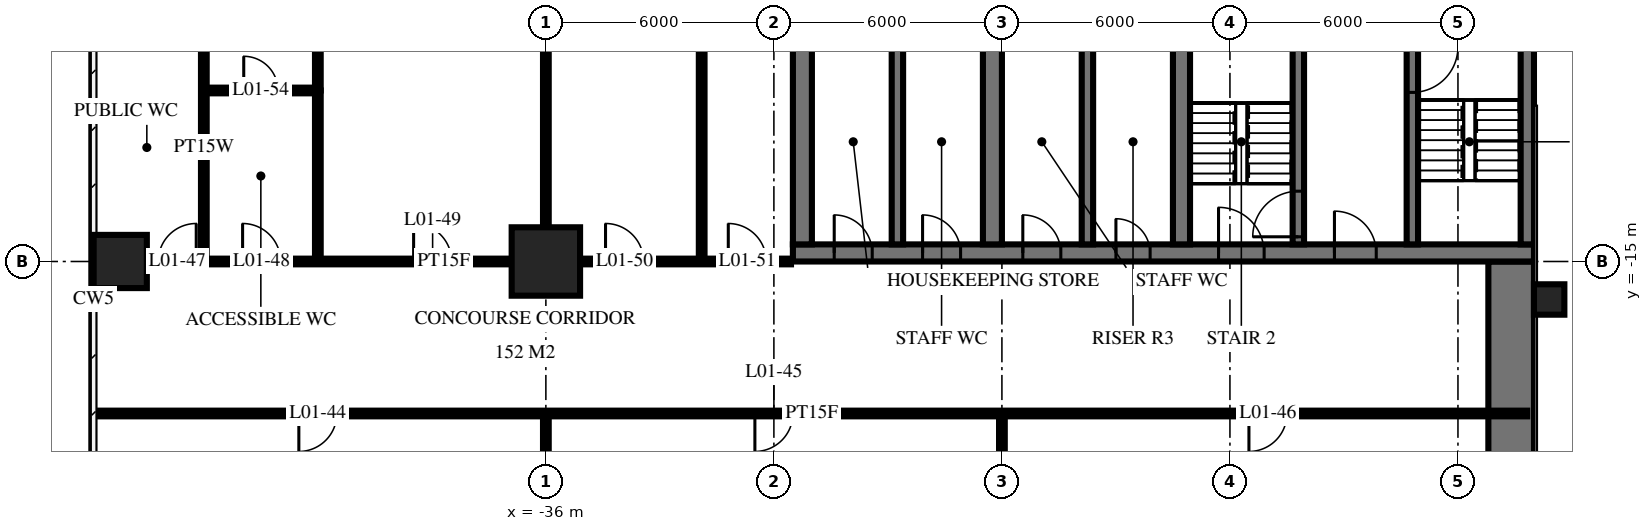
"""IFC4 building model, lengths in metres.
Left out: names, types, materials, properties, quantities, classifications, styles, units other than length and angle.
Written with IfcOpenShell. Run it as: python <this file> out.ifc"""

import sys

from ifc_helpers import new_model, si_unit, direction, frame, frame_2d, origin, origin_2d, place, context, subcontext, project, spatial, rectangle, circle, extrude, element, fill, save


model = new_model("IFC4")
c1 = context("Model", 3, precision=1e-05, world=origin(), true_north=direction((0.0, 1.0)))
c2 = subcontext(c1, "Body", "Model", "MODEL_VIEW")
j1 = project(units=[si_unit("LENGTHUNIT", "METRE"), si_unit("PLANEANGLEUNIT", "RADIAN")], contexts=[c1])
p1 = place(None, origin())
s1 = spatial("IfcSite", under=j1, at=p1, CompositionType="ELEMENT")
p2 = place(p1, origin())
s2 = spatial("IfcBuilding", under=s1, at=p2, CompositionType="ELEMENT")
p3 = place(p2, frame((0.0, 0.0, 7.0)))
s3 = spatial("IfcBuildingStorey", under=s2, at=p3, CompositionType="ELEMENT", Elevation=7.0)
p4 = place(p3, frame((-47.2, -15.0, 0.0), z_axis=(0.0, 0.0, 1.0), x_axis=(1.0, 0.0, 0.0)))
e1 = element("IfcColumn", 1, at=p4, inside=s3, PredefinedType="COLUMN", context=c2, shape_type="SweptSolid", body=[
    extrude(circle(Radius=0.7, at=origin_2d()), origin(), (0.0, 0.0, 1.0), 5.5),
])
p5 = place(p3, frame((-36.0, -15.0, 0.0), z_axis=(0.0, 0.0, 1.0), x_axis=(1.0, 0.0, 0.0)))
e2 = element("IfcColumn", 2, at=p5, inside=s3, PredefinedType="COLUMN", context=c2, shape_type="SweptSolid", body=[
    extrude(circle(Radius=0.9, at=origin_2d()), origin(), (0.0, 0.0, 1.0), 5.5),
])
p6 = place(p3, frame((-29.5, -14.775, 0.0), z_axis=(0.0, 0.0, 1.0), x_axis=(1.0, 0.0, 0.0)))
e3 = element("IfcWall", 3, at=p6, inside=s3, PredefinedType="SHEAR", context=c2, shape_type="SweptSolid", body=[
    extrude(rectangle(XDim=19.5, YDim=0.45, at=frame_2d((9.75, 0.0))), origin(), (0.0, 0.0, 1.0), 5.5),
])
p7 = place(p6, frame((11.2, 0.0, 0.0)))
e4 = element("IfcOpeningElement", 4, at=p7, cuts=e3, PredefinedType="OPENING", context=c2, shape_type="SweptSolid", body=[
    extrude(rectangle(XDim=1.2, YDim=2.1, at=frame_2d((0.6, 1.05))), frame((0.0, 0.235, 0.0), z_axis=(0.0, -1.0, 0.0), x_axis=(1.0, 0.0, 0.0)), (0.0, 0.0, 1.0), 0.47),
])
p8 = place(p6, frame((14.25, 0.0, 0.0)))
e5 = element("IfcOpeningElement", 5, at=p8, cuts=e3, PredefinedType="OPENING", context=c2, shape_type="SweptSolid", body=[
    extrude(rectangle(XDim=1.1, YDim=2.1, at=frame_2d((0.55, 1.05))), frame((0.0, 0.235, 0.0), z_axis=(0.0, -1.0, 0.0), x_axis=(1.0, 0.0, 0.0)), (0.0, 0.0, 1.0), 0.47),
])
p9 = place(p6, frame((8.5, 0.0, 0.0)))
e6 = element("IfcOpeningElement", 6, at=p9, cuts=e3, PredefinedType="OPENING", context=c2, shape_type="SweptSolid", body=[
    extrude(rectangle(XDim=0.9, YDim=2.1, at=frame_2d((0.45, 1.05))), frame((0.0, 0.235, 0.0), z_axis=(0.0, -1.0, 0.0), x_axis=(1.0, 0.0, 0.0)), (0.0, 0.0, 1.0), 0.47),
])
p10 = place(p6, frame((6.05, 0.0, 0.0)))
e7 = element("IfcOpeningElement", 7, at=p10, cuts=e3, PredefinedType="OPENING", context=c2, shape_type="SweptSolid", body=[
    extrude(rectangle(XDim=1.0, YDim=2.1, at=frame_2d((0.5, 1.05))), frame((0.0, 0.235, 0.0), z_axis=(0.0, -1.0, 0.0), x_axis=(1.0, 0.0, 0.0)), (0.0, 0.0, 1.0), 0.47),
])
p11 = place(p6, frame((3.413, 0.0, 0.0)))
e8 = element("IfcOpeningElement", 8, at=p11, cuts=e3, PredefinedType="OPENING", context=c2, shape_type="SweptSolid", body=[
    extrude(rectangle(XDim=1.0, YDim=2.1, at=frame_2d((0.5, 1.05))), frame((0.0, 0.235, 0.0), z_axis=(0.0, -1.0, 0.0), x_axis=(1.0, 0.0, 0.0)), (0.0, 0.0, 1.0), 0.47),
])
p12 = place(p6, frame((1.087, 0.0, 0.0)))
e9 = element("IfcOpeningElement", 9, at=p12, cuts=e3, PredefinedType="OPENING", context=c2, shape_type="SweptSolid", body=[
    extrude(rectangle(XDim=1.0, YDim=2.1, at=frame_2d((0.5, 1.05))), frame((0.0, 0.235, 0.0), z_axis=(0.0, -1.0, 0.0), x_axis=(1.0, 0.0, 0.0)), (0.0, 0.0, 1.0), 0.47),
])
p13 = place(p3, frame((-10.175, -14.55, 0.0), z_axis=(0.0, 0.0, 1.0), x_axis=(0.0, 1.0, 0.0)))
e10 = element("IfcWall", 10, at=p13, inside=s3, PredefinedType="SHEAR", context=c2, shape_type="SweptSolid", body=[
    extrude(rectangle(XDim=14.1, YDim=0.35, at=frame_2d((7.05, 0.0))), origin(), (0.0, 0.0, 1.0), 5.5),
])
p14 = place(p3, frame((-29.25, -14.55, 0.0), z_axis=(0.0, 0.0, 1.0), x_axis=(0.0, 1.0, 0.0)))
e11 = element("IfcWall", 11, at=p14, inside=s3, PredefinedType="SHEAR", context=c2, shape_type="SweptSolid", body=[
    extrude(rectangle(XDim=14.1, YDim=0.5, at=frame_2d((7.05, 0.0))), origin(), (0.0, 0.0, 1.0), 5.5),
])
p15 = place(p14, frame((8.4, 0.0, 0.0)))
e12 = element("IfcOpeningElement", 12, at=p15, cuts=e11, PredefinedType="OPENING", context=c2, shape_type="SweptSolid", body=[
    extrude(rectangle(XDim=1.4, YDim=2.4, at=frame_2d((0.7, 1.2))), frame((0.0, 0.26, 0.0), z_axis=(0.0, -1.0, 0.0), x_axis=(1.0, 0.0, 0.0)), (0.0, 0.0, 1.0), 0.52),
])
p16 = place(p14, frame((10.0, 0.0, 0.0)))
e13 = element("IfcOpeningElement", 13, at=p16, cuts=e11, PredefinedType="OPENING", context=c2, shape_type="SweptSolid", body=[
    extrude(rectangle(XDim=1.4, YDim=2.4, at=frame_2d((0.7, 1.2))), frame((0.0, 0.26, 0.0), z_axis=(0.0, -1.0, 0.0), x_axis=(1.0, 0.0, 0.0)), (0.0, 0.0, 1.0), 0.52),
])
p17 = place(p3, frame((-13.2, -14.55, 0.0), z_axis=(0.0, 0.0, 1.0), x_axis=(0.0, 1.0, 0.0)))
e14 = element("IfcWall", 14, at=p17, inside=s3, PredefinedType="SHEAR", context=c2, shape_type="SweptSolid", body=[
    extrude(rectangle(XDim=5.4, YDim=0.3, at=frame_2d((2.7, 0.0))), origin(), (0.0, 0.0, 1.0), 5.5),
])
p18 = place(p17, frame((4.0, 0.0, 0.0)))
e15 = element("IfcOpeningElement", 15, at=p18, cuts=e14, PredefinedType="OPENING", context=c2, shape_type="SweptSolid", body=[
    extrude(rectangle(XDim=1.2, YDim=2.1, at=frame_2d((0.6, 1.05))), frame((0.0, 0.16, 0.0), z_axis=(0.0, -1.0, 0.0), x_axis=(1.0, 0.0, 0.0)), (0.0, 0.0, 1.0), 0.32),
])
p19 = place(p3, frame((-16.2, -14.55, 0.0), z_axis=(0.0, 0.0, 1.0), x_axis=(0.0, 1.0, 0.0)))
e16 = element("IfcWall", 16, at=p19, inside=s3, PredefinedType="SHEAR", context=c2, shape_type="SweptSolid", body=[
    extrude(rectangle(XDim=5.4, YDim=0.3, at=frame_2d((2.7, 0.0))), origin(), (0.0, 0.0, 1.0), 5.5),
])
p20 = place(p19, frame((0.2, 0.0, 0.0)))
e17 = element("IfcOpeningElement", 17, at=p20, cuts=e16, PredefinedType="OPENING", context=c2, shape_type="SweptSolid", body=[
    extrude(rectangle(XDim=1.2, YDim=2.1, at=frame_2d((0.6, 1.05))), frame((0.0, 0.16, 0.0), z_axis=(0.0, -1.0, 0.0), x_axis=(1.0, 0.0, 0.0)), (0.0, 0.0, 1.0), 0.32),
])
p21 = place(p3, frame((-19.275, -14.55, 0.0), z_axis=(0.0, 0.0, 1.0), x_axis=(0.0, 1.0, 0.0)))
e18 = element("IfcWall", 18, at=p21, inside=s3, PredefinedType="SHEAR", context=c2, shape_type="SweptSolid", body=[
    extrude(rectangle(XDim=5.4, YDim=0.45, at=frame_2d((2.7, 0.0))), origin(), (0.0, 0.0, 1.0), 5.5),
])
p22 = place(p3, frame((-21.75, -14.55, 0.0), z_axis=(0.0, 0.0, 1.0), x_axis=(0.0, 1.0, 0.0)))
e19 = element("IfcWall", 19, at=p22, inside=s3, PredefinedType="SHEAR", context=c2, shape_type="SweptSolid", body=[
    extrude(rectangle(XDim=5.4, YDim=0.3, at=frame_2d((2.7, 0.0))), origin(), (0.0, 0.0, 1.0), 5.5),
])
p23 = place(p3, frame((-24.25, -14.55, 0.0), z_axis=(0.0, 0.0, 1.0), x_axis=(0.0, 1.0, 0.0)))
e20 = element("IfcWall", 20, at=p23, inside=s3, PredefinedType="SHEAR", context=c2, shape_type="SweptSolid", body=[
    extrude(rectangle(XDim=5.4, YDim=0.5, at=frame_2d((2.7, 0.0))), origin(), (0.0, 0.0, 1.0), 5.5),
])
p24 = place(p3, frame((-26.75, -14.55, 0.0), z_axis=(0.0, 0.0, 1.0), x_axis=(0.0, 1.0, 0.0)))
e21 = element("IfcWall", 21, at=p24, inside=s3, PredefinedType="SHEAR", context=c2, shape_type="SweptSolid", body=[
    extrude(rectangle(XDim=5.4, YDim=0.3, at=frame_2d((2.7, 0.0))), origin(), (0.0, 0.0, 1.0), 5.5),
])
p25 = place(p3, frame((-10.6, -40.0, 0.0), z_axis=(0.0, 0.0, 1.0), x_axis=(0.0, 1.0, 0.0)))
e22 = element("IfcWall", 22, at=p25, inside=s3, PredefinedType="SHEAR", context=c2, shape_type="SweptSolid", body=[
    extrude(rectangle(XDim=25.0, YDim=1.2, at=frame_2d((12.5, 0.0))), origin(), (0.0, 0.0, 1.0), 5.5),
])
p26 = place(p3, frame((-9.6, -16.0, 0.0), z_axis=(0.0, 0.0, 1.0), x_axis=(1.0, 0.0, 0.0)))
e23 = element("IfcColumn", 23, at=p26, inside=s3, PredefinedType="COLUMN", context=c2, shape_type="SweptSolid", body=[
    extrude(rectangle(XDim=0.8, YDim=0.8, at=origin_2d()), origin(), (0.0, 0.0, 1.0), 5.5),
])
p27 = place(p3, frame((-24.0, -39.82, 0.0), z_axis=(0.0, 0.0, 1.0), x_axis=(0.0, 1.0, 0.0)))
e24 = element("IfcWall", 24, at=p27, inside=s3, PredefinedType="PARTITIONING", context=c2, shape_type="SweptSolid", body=[
    extrude(rectangle(XDim=20.82, YDim=0.15, at=frame_2d((10.41, 0.0))), origin(), (0.0, 0.0, 1.0), 5.05),
])
p28 = place(p3, frame((-31.9, -15.0, 0.0), z_axis=(0.0, 0.0, 1.0), x_axis=(0.0, 1.0, 0.0)))
e25 = element("IfcWall", 25, at=p28, inside=s3, PredefinedType="PARTITIONING", context=c2, shape_type="SweptSolid", body=[
    extrude(rectangle(XDim=12.5, YDim=0.15, at=frame_2d((6.25, 0.0))), origin(), (0.0, 0.0, 1.0), 5.05),
])
p29 = place(p3, frame((-36.0, -39.82, 0.0), z_axis=(0.0, 0.0, 1.0), x_axis=(0.0, 1.0, 0.0)))
e26 = element("IfcWall", 26, at=p29, inside=s3, PredefinedType="PARTITIONING", context=c2, shape_type="SweptSolid", body=[
    extrude(rectangle(XDim=20.82, YDim=0.15, at=frame_2d((10.41, 0.0))), origin(), (0.0, 0.0, 1.0), 5.05),
])
p30 = place(p3, frame((-36.0, -15.0, 0.0), z_axis=(0.0, 0.0, 1.0), x_axis=(0.0, 1.0, 0.0)))
e27 = element("IfcWall", 27, at=p30, inside=s3, PredefinedType="PARTITIONING", context=c2, shape_type="SweptSolid", body=[
    extrude(rectangle(XDim=22.82, YDim=0.15, at=frame_2d((11.41, 0.0))), origin(), (0.0, 0.0, 1.0), 5.05),
])
p31 = place(p3, frame((-42.0, -10.5, 0.0), z_axis=(0.0, 0.0, 1.0), x_axis=(0.0, 1.0, 0.0)))
e28 = element("IfcWall", 28, at=p31, inside=s3, PredefinedType="PARTITIONING", context=c2, shape_type="SweptSolid", body=[
    extrude(rectangle(XDim=18.316, YDim=0.15, at=frame_2d((9.158, 0.0))), origin(), (0.0, 0.0, 1.0), 5.05),
])
p32 = place(p3, frame((-42.0, -15.0, 0.0), z_axis=(0.0, 0.0, 1.0), x_axis=(0.0, 1.0, 0.0)))
e29 = element("IfcWall", 29, at=p32, inside=s3, PredefinedType="PLUMBINGWALL", context=c2, shape_type="SweptSolid", body=[
    extrude(rectangle(XDim=4.5, YDim=0.15, at=frame_2d((2.25, 0.0))), origin(), (0.0, 0.0, 1.0), 5.05),
])
p33 = place(p3, frame((-45.0, -15.0, 0.0), z_axis=(0.0, 0.0, 1.0), x_axis=(0.0, 1.0, 0.0)))
e30 = element("IfcWall", 30, at=p33, inside=s3, PredefinedType="PLUMBINGWALL", context=c2, shape_type="SweptSolid", body=[
    extrude(rectangle(XDim=6.0, YDim=0.15, at=frame_2d((3.0, 0.0))), origin(), (0.0, 0.0, 1.0), 5.05),
])
p34 = place(p3, frame((-47.82, -19.0, 0.0), z_axis=(0.0, 0.0, 1.0), x_axis=(1.0, 0.0, 0.0)))
e31 = element("IfcWall", 31, at=p34, inside=s3, PredefinedType="PARTITIONING", context=c2, shape_type="SweptSolid", body=[
    extrude(rectangle(XDim=37.64, YDim=0.15, at=frame_2d((18.82, 0.0))), origin(), (0.0, 0.0, 1.0), 5.05),
])
p35 = place(p34, frame((5.32, 0.0, 0.0)))
e32 = element("IfcOpeningElement", 32, at=p35, cuts=e31, PredefinedType="OPENING", context=c2, shape_type="SweptSolid", body=[
    extrude(rectangle(XDim=1.0, YDim=2.1, at=frame_2d((0.5, 1.05))), frame((0.0, 0.085, 0.0), z_axis=(0.0, -1.0, 0.0), x_axis=(1.0, 0.0, 0.0)), (0.0, 0.0, 1.0), 0.17),
])
p36 = place(p34, frame((17.32, 0.0, 0.0)))
e33 = element("IfcOpeningElement", 33, at=p36, cuts=e31, PredefinedType="OPENING", context=c2, shape_type="SweptSolid", body=[
    extrude(rectangle(XDim=1.0, YDim=2.1, at=frame_2d((0.5, 1.05))), frame((0.0, 0.085, 0.0), z_axis=(0.0, -1.0, 0.0), x_axis=(1.0, 0.0, 0.0)), (0.0, 0.0, 1.0), 0.17),
])
p37 = place(p34, frame((30.32, 0.0, 0.0)))
e34 = element("IfcOpeningElement", 34, at=p37, cuts=e31, PredefinedType="OPENING", context=c2, shape_type="SweptSolid", body=[
    extrude(rectangle(XDim=1.0, YDim=2.1, at=frame_2d((0.5, 1.05))), frame((0.0, 0.085, 0.0), z_axis=(0.0, -1.0, 0.0), x_axis=(1.0, 0.0, 0.0)), (0.0, 0.0, 1.0), 0.17),
])
p38 = place(p3, frame((-47.82, -15.0, 0.0), z_axis=(0.0, 0.0, 1.0), x_axis=(1.0, 0.0, 0.0)))
e35 = element("IfcWall", 35, at=p38, inside=s3, PredefinedType="PARTITIONING", context=c2, shape_type="SweptSolid", body=[
    extrude(rectangle(XDim=18.27, YDim=0.15, at=frame_2d((9.135, 0.0))), origin(), (0.0, 0.0, 1.0), 5.05),
])
p39 = place(p38, frame((1.62, 0.0, 0.0)))
e36 = element("IfcOpeningElement", 36, at=p39, cuts=e35, PredefinedType="OPENING", context=c2, shape_type="SweptSolid", body=[
    extrude(rectangle(XDim=1.0, YDim=2.1, at=frame_2d((0.5, 1.05))), frame((0.0, 0.085, 0.0), z_axis=(0.0, -1.0, 0.0), x_axis=(1.0, 0.0, 0.0)), (0.0, 0.0, 1.0), 0.17),
])
p40 = place(p38, frame((3.84, 0.0, 0.0)))
e37 = element("IfcOpeningElement", 37, at=p40, cuts=e35, PredefinedType="OPENING", context=c2, shape_type="SweptSolid", body=[
    extrude(rectangle(XDim=1.0, YDim=2.1, at=frame_2d((0.5, 1.05))), frame((0.0, 0.085, 0.0), z_axis=(0.0, -1.0, 0.0), x_axis=(1.0, 0.0, 0.0)), (0.0, 0.0, 1.0), 0.17),
])
p41 = place(p38, frame((8.34, 0.0, 0.0)))
e38 = element("IfcOpeningElement", 38, at=p41, cuts=e35, PredefinedType="OPENING", context=c2, shape_type="SweptSolid", body=[
    extrude(rectangle(XDim=1.0, YDim=2.1, at=frame_2d((0.5, 1.05))), frame((0.0, 0.085, 0.0), z_axis=(0.0, -1.0, 0.0), x_axis=(1.0, 0.0, 0.0)), (0.0, 0.0, 1.0), 0.17),
])
p42 = place(p38, frame((13.39, 0.0, 0.0)))
e39 = element("IfcOpeningElement", 39, at=p42, cuts=e35, PredefinedType="OPENING", context=c2, shape_type="SweptSolid", body=[
    extrude(rectangle(XDim=1.0, YDim=2.1, at=frame_2d((0.5, 1.05))), frame((0.0, 0.085, 0.0), z_axis=(0.0, -1.0, 0.0), x_axis=(1.0, 0.0, 0.0)), (0.0, 0.0, 1.0), 0.17),
])
p43 = place(p38, frame((16.62, 0.0, 0.0)))
e40 = element("IfcOpeningElement", 40, at=p43, cuts=e35, PredefinedType="OPENING", context=c2, shape_type="SweptSolid", body=[
    extrude(rectangle(XDim=1.0, YDim=2.1, at=frame_2d((0.5, 1.05))), frame((0.0, 0.085, 0.0), z_axis=(0.0, -1.0, 0.0), x_axis=(1.0, 0.0, 0.0)), (0.0, 0.0, 1.0), 0.17),
])
p44 = place(p3, frame((-45.0, -10.5, 0.0), z_axis=(0.0, 0.0, 1.0), x_axis=(1.0, 0.0, 0.0)))
e41 = element("IfcWall", 41, at=p44, inside=s3, PredefinedType="PLUMBINGWALL", context=c2, shape_type="SweptSolid", body=[
    extrude(rectangle(XDim=3.0, YDim=0.15, at=frame_2d((1.5, 0.0))), origin(), (0.0, 0.0, 1.0), 5.05),
])
p45 = place(p44, frame((1.05, 0.0, 0.0)))
e42 = element("IfcOpeningElement", 42, at=p45, cuts=e41, PredefinedType="OPENING", context=c2, shape_type="SweptSolid", body=[
    extrude(rectangle(XDim=0.9, YDim=2.1, at=frame_2d((0.45, 1.05))), frame((0.0, 0.085, 0.0), z_axis=(0.0, -1.0, 0.0), x_axis=(1.0, 0.0, 0.0)), (0.0, 0.0, 1.0), 0.17),
])
p46 = place(p7, origin())
e43 = element("IfcDoor", 43, at=p46, inside=s3, OperationType="SINGLE_SWING_RIGHT", PredefinedType="DOOR", context=c2, shape_type="SweptSolid", body=[
    extrude(rectangle(XDim=1.2, YDim=2.1, at=frame_2d((0.6, 1.05))), frame((0.0, 0.025, 0.0), z_axis=(0.0, -1.0, 0.0), x_axis=(1.0, 0.0, 0.0)), (0.0, 0.0, 1.0), 0.05),
])
fill(e4, e43)
p47 = place(p8, origin())
e44 = element("IfcDoor", 44, at=p47, inside=s3, OperationType="SINGLE_SWING_RIGHT", PredefinedType="DOOR", context=c2, shape_type="SweptSolid", body=[
    extrude(rectangle(XDim=1.1, YDim=2.1, at=frame_2d((0.55, 1.05))), frame((0.0, 0.025, 0.0), z_axis=(0.0, -1.0, 0.0), x_axis=(1.0, 0.0, 0.0)), (0.0, 0.0, 1.0), 0.05),
])
fill(e5, e44)
p48 = place(p9, origin())
e45 = element("IfcDoor", 45, at=p48, inside=s3, OperationType="SINGLE_SWING_RIGHT", PredefinedType="DOOR", context=c2, shape_type="SweptSolid", body=[
    extrude(rectangle(XDim=0.9, YDim=2.1, at=frame_2d((0.45, 1.05))), frame((0.0, 0.025, 0.0), z_axis=(0.0, -1.0, 0.0), x_axis=(1.0, 0.0, 0.0)), (0.0, 0.0, 1.0), 0.05),
])
fill(e6, e45)
p49 = place(p10, origin())
e46 = element("IfcDoor", 46, at=p49, inside=s3, OperationType="SINGLE_SWING_RIGHT", PredefinedType="DOOR", context=c2, shape_type="SweptSolid", body=[
    extrude(rectangle(XDim=1.0, YDim=2.1, at=frame_2d((0.5, 1.05))), frame((0.0, 0.025, 0.0), z_axis=(0.0, -1.0, 0.0), x_axis=(1.0, 0.0, 0.0)), (0.0, 0.0, 1.0), 0.05),
])
fill(e7, e46)
p50 = place(p11, origin())
e47 = element("IfcDoor", 47, at=p50, inside=s3, OperationType="SINGLE_SWING_RIGHT", PredefinedType="DOOR", context=c2, shape_type="SweptSolid", body=[
    extrude(rectangle(XDim=1.0, YDim=2.1, at=frame_2d((0.5, 1.05))), frame((0.0, 0.025, 0.0), z_axis=(0.0, -1.0, 0.0), x_axis=(1.0, 0.0, 0.0)), (0.0, 0.0, 1.0), 0.05),
])
fill(e8, e47)
p51 = place(p12, origin())
e48 = element("IfcDoor", 48, at=p51, inside=s3, OperationType="SINGLE_SWING_RIGHT", PredefinedType="DOOR", context=c2, shape_type="SweptSolid", body=[
    extrude(rectangle(XDim=1.0, YDim=2.1, at=frame_2d((0.5, 1.05))), frame((0.0, 0.025, 0.0), z_axis=(0.0, -1.0, 0.0), x_axis=(1.0, 0.0, 0.0)), (0.0, 0.0, 1.0), 0.05),
])
fill(e9, e48)
p52 = place(p18, frame((0.6, 0.0, 0.0), z_axis=(0.0, 0.0, 1.0), x_axis=(-1.0, 0.0, 0.0)))
e49 = element("IfcDoor", 49, at=p52, inside=s3, OperationType="SINGLE_SWING_RIGHT", PredefinedType="DOOR", context=c2, shape_type="SweptSolid", body=[
    extrude(rectangle(XDim=1.2, YDim=2.1, at=frame_2d((0.0, 1.05))), frame((0.0, -0.025, 0.0), z_axis=(0.0, 1.0, 0.0), x_axis=(-1.0, 0.0, 0.0)), (0.0, 0.0, 1.0), 0.05),
])
fill(e15, e49)
p53 = place(p20, origin())
e50 = element("IfcDoor", 50, at=p53, inside=s3, OperationType="SINGLE_SWING_RIGHT", PredefinedType="DOOR", context=c2, shape_type="SweptSolid", body=[
    extrude(rectangle(XDim=1.2, YDim=2.1, at=frame_2d((0.6, 1.05))), frame((0.0, 0.025, 0.0), z_axis=(0.0, -1.0, 0.0), x_axis=(1.0, 0.0, 0.0)), (0.0, 0.0, 1.0), 0.05),
])
fill(e17, e50)
p54 = place(p35, frame((0.5, 0.0, 0.0), z_axis=(0.0, 0.0, 1.0), x_axis=(-1.0, 0.0, 0.0)))
e51 = element("IfcDoor", 51, at=p54, inside=s3, OperationType="SINGLE_SWING_LEFT", PredefinedType="DOOR", context=c2, shape_type="SweptSolid", body=[
    extrude(rectangle(XDim=1.0, YDim=2.1, at=frame_2d((0.0, 1.05))), frame((0.0, -0.025, 0.0), z_axis=(0.0, 1.0, 0.0), x_axis=(-1.0, 0.0, 0.0)), (0.0, 0.0, 1.0), 0.05),
])
fill(e32, e51)
p55 = place(p36, frame((0.5, 0.0, 0.0), z_axis=(0.0, 0.0, 1.0), x_axis=(-1.0, 0.0, 0.0)))
e52 = element("IfcDoor", 52, at=p55, inside=s3, OperationType="SINGLE_SWING_LEFT", PredefinedType="DOOR", context=c2, shape_type="SweptSolid", body=[
    extrude(rectangle(XDim=1.0, YDim=2.1, at=frame_2d((0.0, 1.05))), frame((0.0, -0.025, 0.0), z_axis=(0.0, 1.0, 0.0), x_axis=(-1.0, 0.0, 0.0)), (0.0, 0.0, 1.0), 0.05),
])
fill(e33, e52)
p56 = place(p37, frame((0.5, 0.0, 0.0), z_axis=(0.0, 0.0, 1.0), x_axis=(-1.0, 0.0, 0.0)))
e53 = element("IfcDoor", 53, at=p56, inside=s3, OperationType="SINGLE_SWING_LEFT", PredefinedType="DOOR", context=c2, shape_type="SweptSolid", body=[
    extrude(rectangle(XDim=1.0, YDim=2.1, at=frame_2d((0.0, 1.05))), frame((0.0, -0.025, 0.0), z_axis=(0.0, 1.0, 0.0), x_axis=(-1.0, 0.0, 0.0)), (0.0, 0.0, 1.0), 0.05),
])
fill(e34, e53)
p57 = place(p39, origin())
e54 = element("IfcDoor", 54, at=p57, inside=s3, OperationType="SINGLE_SWING_LEFT", PredefinedType="DOOR", context=c2, shape_type="SweptSolid", body=[
    extrude(rectangle(XDim=1.0, YDim=2.1, at=frame_2d((0.5, 1.05))), frame((0.0, 0.025, 0.0), z_axis=(0.0, -1.0, 0.0), x_axis=(1.0, 0.0, 0.0)), (0.0, 0.0, 1.0), 0.05),
])
fill(e36, e54)
p58 = place(p40, origin())
e55 = element("IfcDoor", 55, at=p58, inside=s3, OperationType="SINGLE_SWING_RIGHT", PredefinedType="DOOR", context=c2, shape_type="SweptSolid", body=[
    extrude(rectangle(XDim=1.0, YDim=2.1, at=frame_2d((0.5, 1.05))), frame((0.0, 0.025, 0.0), z_axis=(0.0, -1.0, 0.0), x_axis=(1.0, 0.0, 0.0)), (0.0, 0.0, 1.0), 0.05),
])
fill(e37, e55)
p59 = place(p41, origin())
e56 = element("IfcDoor", 56, at=p59, inside=s3, OperationType="SINGLE_SWING_RIGHT", PredefinedType="DOOR", context=c2, shape_type="SweptSolid", body=[
    extrude(rectangle(XDim=1.0, YDim=2.1, at=frame_2d((0.5, 1.05))), frame((0.0, 0.025, 0.0), z_axis=(0.0, -1.0, 0.0), x_axis=(1.0, 0.0, 0.0)), (0.0, 0.0, 1.0), 0.05),
])
fill(e38, e56)
p60 = place(p42, origin())
e57 = element("IfcDoor", 57, at=p60, inside=s3, OperationType="SINGLE_SWING_RIGHT", PredefinedType="DOOR", context=c2, shape_type="SweptSolid", body=[
    extrude(rectangle(XDim=1.0, YDim=2.1, at=frame_2d((0.5, 1.05))), frame((0.0, 0.025, 0.0), z_axis=(0.0, -1.0, 0.0), x_axis=(1.0, 0.0, 0.0)), (0.0, 0.0, 1.0), 0.05),
])
fill(e39, e57)
p61 = place(p43, origin())
e58 = element("IfcDoor", 58, at=p61, inside=s3, OperationType="SINGLE_SWING_RIGHT", PredefinedType="DOOR", context=c2, shape_type="SweptSolid", body=[
    extrude(rectangle(XDim=1.0, YDim=2.1, at=frame_2d((0.5, 1.05))), frame((0.0, 0.025, 0.0), z_axis=(0.0, -1.0, 0.0), x_axis=(1.0, 0.0, 0.0)), (0.0, 0.0, 1.0), 0.05),
])
fill(e40, e58)
p62 = place(p45, origin())
e59 = element("IfcDoor", 59, at=p62, inside=s3, OperationType="SINGLE_SWING_RIGHT", PredefinedType="DOOR", context=c2, shape_type="SweptSolid", body=[
    extrude(rectangle(XDim=0.9, YDim=2.1, at=frame_2d((0.45, 1.05))), frame((0.0, 0.025, 0.0), z_axis=(0.0, -1.0, 0.0), x_axis=(1.0, 0.0, 0.0)), (0.0, 0.0, 1.0), 0.05),
])
fill(e42, e59)
save(model, sys.argv[1])
